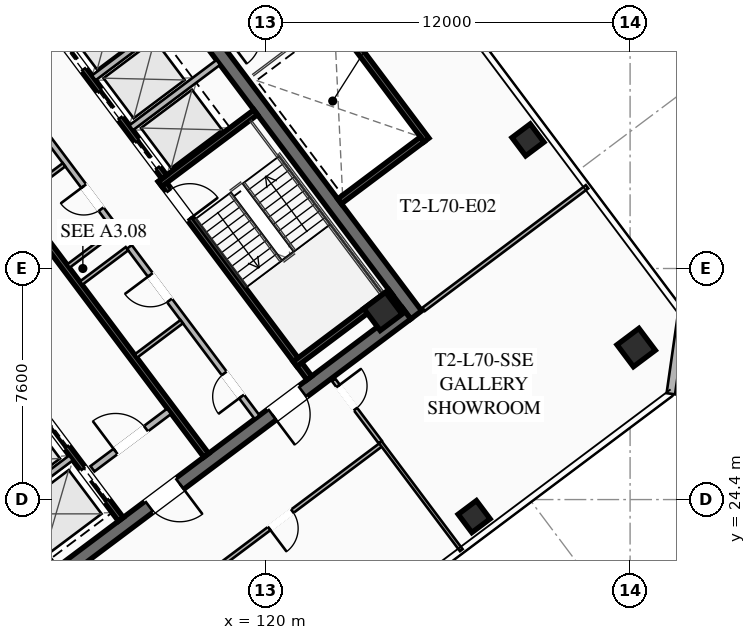
"""IFC4 building model, lengths in metres.
Left out: names, types, materials, properties, quantities, classifications, styles, units other than length and angle.
Written with IfcOpenShell. Run it as: python <this file> out.ifc"""

import sys

from ifc_helpers import new_model, si_unit, direction, frame, frame_2d, origin, origin_2d, place, context, subcontext, project, spatial, rectangle, hollow_rectangle, extrude, element, fill, save


model = new_model("IFC4")
c1 = context("Model", 3, precision=1e-05, world=origin(), true_north=direction((0.0, 1.0)))
c2 = subcontext(c1, "Body", "Model", "MODEL_VIEW")
j1 = project(units=[si_unit("LENGTHUNIT", "METRE"), si_unit("PLANEANGLEUNIT", "RADIAN")], contexts=[c1])
p1 = place(None, origin())
s1 = spatial("IfcSite", under=j1, at=p1, CompositionType="ELEMENT")
p2 = place(p1, origin())
s2 = spatial("IfcBuilding", under=s1, at=p2, CompositionType="ELEMENT")
p3 = place(p2, frame((0.0, 0.0, 259.4)))
s3 = spatial("IfcBuildingStorey", under=s2, at=p3, CompositionType="ELEMENT", Elevation=259.4)
p4 = place(p3, frame((115.604, 42.953, 0.0), z_axis=(0.0, 0.0, 1.0), x_axis=(0.600005007985, -0.799996243986, 0.0)))
e1 = element("IfcWall", 1, at=p4, inside=s3, PredefinedType="SHEAR", context=c2, shape_type="SweptSolid", body=[
    extrude(rectangle(XDim=15.6, YDim=0.45, at=frame_2d((7.8, 0.0))), origin(), (0.0, 0.0, 1.0), 4.0),
])
p5 = place(p3, frame((124.649, 30.518, 0.0), z_axis=(0.0, 0.0, 1.0), x_axis=(-0.8, -0.6, 0.0)))
e2 = element("IfcWall", 2, at=p5, inside=s3, PredefinedType="SHEAR", context=c2, shape_type="SweptSolid", body=[
    extrude(rectangle(XDim=15.26, YDim=0.45, at=frame_2d((7.63, 0.0))), origin(), (0.0, 0.0, 1.0), 4.0),
])
p6 = place(p5, frame((9.33, 0.0, 0.0)))
e3 = element("IfcOpeningElement", 3, at=p6, cuts=e2, PredefinedType="OPENING", context=c2, shape_type="SweptSolid", body=[
    extrude(rectangle(XDim=1.25, YDim=2.25, at=frame_2d((0.625, 1.125))), frame((0.0, 0.235, 0.0), z_axis=(0.0, -1.0, 0.0), x_axis=(1.0, 0.0, 0.0)), (0.0, 0.0, 1.0), 0.47),
])
p7 = place(p5, frame((4.28, 0.0, 0.0)))
e4 = element("IfcOpeningElement", 4, at=p7, cuts=e2, PredefinedType="OPENING", context=c2, shape_type="SweptSolid", body=[
    extrude(rectangle(XDim=1.25, YDim=2.25, at=frame_2d((0.625, 1.125))), frame((0.0, 0.235, 0.0), z_axis=(0.0, -1.0, 0.0), x_axis=(1.0, 0.0, 0.0)), (0.0, 0.0, 1.0), 0.47),
])
p8 = place(p3, frame((103.351, 33.482, 0.0), z_axis=(0.0, 0.0, 1.0), x_axis=(0.8, 0.6, 0.0)))
e5 = element("IfcWall", 5, at=p8, inside=s3, PredefinedType="SHEAR", context=c2, shape_type="SweptSolid", body=[
    extrude(rectangle(XDim=15.26, YDim=0.45, at=frame_2d((7.63, 0.0))), origin(), (0.0, 0.0, 1.0), 4.0),
])
p9 = place(p8, frame((4.68, 0.0, 0.0)))
e6 = element("IfcOpeningElement", 6, at=p9, cuts=e5, PredefinedType="OPENING", context=c2, shape_type="SweptSolid", body=[
    extrude(rectangle(XDim=1.25, YDim=2.25, at=frame_2d((0.625, 1.125))), frame((0.0, 0.235, 0.0), z_axis=(0.0, -1.0, 0.0), x_axis=(1.0, 0.0, 0.0)), (0.0, 0.0, 1.0), 0.47),
])
p10 = place(p8, frame((9.73, 0.0, 0.0)))
e7 = element("IfcOpeningElement", 7, at=p10, cuts=e5, PredefinedType="OPENING", context=c2, shape_type="SweptSolid", body=[
    extrude(rectangle(XDim=1.25, YDim=2.25, at=frame_2d((0.625, 1.125))), frame((0.0, 0.235, 0.0), z_axis=(0.0, -1.0, 0.0), x_axis=(1.0, 0.0, 0.0)), (0.0, 0.0, 1.0), 0.47),
])
for number, where, z_axis, x_axis in (
    (8, (112.59, 22.13, 0.0), (0.0, 0.0, 1.0), (0.8, 0.6, 0.0)),
    (9, (123.87, 30.59, 0.0), (0.0, 0.0, 1.0), (0.8, 0.6, 0.0)),
    (10, (132.2, 29.4, 0.0), (0.0, 0.0, 1.0), (0.8, 0.6, 0.0)),
):
    element("IfcColumn", number, at=place(p3, frame(where, z_axis=z_axis, x_axis=x_axis)), inside=s3, PredefinedType="COLUMN", context=c2, shape_type="SweptSolid", body=[
        extrude(hollow_rectangle(XDim=0.9, YDim=0.9, WallThickness=0.04, at=origin_2d()), origin(), (0.0, 0.0, 1.0), 3.7),
    ])
for number, where, z_axis, x_axis in (
    (11, (126.87, 23.84, 0.0), (0.0, 0.0, 1.0), (0.8, 0.6, 0.0)),
    (12, (128.64, 36.23, 0.0), (0.0, 0.0, 1.0), (0.8, 0.6, 0.0)),
):
    element("IfcColumn", number, at=place(p3, frame(where, z_axis=z_axis, x_axis=x_axis)), inside=s3, PredefinedType="COLUMN", context=c2, shape_type="SweptSolid", body=[
        extrude(hollow_rectangle(XDim=0.75, YDim=0.75, WallThickness=0.032, at=origin_2d()), origin(), (0.0, 0.0, 1.0), 3.7),
    ])
p11 = place(p3, frame((133.72, 30.54, 0.0), z_axis=(0.0, 0.0, 1.0), x_axis=(-0.141370477216, -0.989956760759, 0.0)))
e13 = element("IfcWall", 13, at=p11, inside=s3, PredefinedType="SOLIDWALL", context=c2, shape_type="SweptSolid", body=[
    extrude(rectangle(XDim=2.687, YDim=0.28, at=frame_2d((1.344, 0.0))), origin(), (0.0, 0.0, 1.0), 3.7),
])
p12 = place(p3, frame((116.56, 34.92, 0.0), z_axis=(0.0, 0.0, 1.0), x_axis=(0.59999041401, -0.800007189403, 0.0)))
e14 = element("IfcWall", 14, at=p12, inside=s3, PredefinedType="SHEAR", context=c2, shape_type="SweptSolid", body=[
    extrude(rectangle(XDim=8.15, YDim=0.2, at=frame_2d((4.075, 0.0))), origin(), (0.0, 0.0, 1.0), 3.7),
])
p13 = place(p12, frame((0.45, 0.0, 0.0)))
e15 = element("IfcOpeningElement", 15, at=p13, cuts=e14, PredefinedType="OPENING", context=c2, shape_type="SweptSolid", body=[
    extrude(rectangle(XDim=1.15, YDim=2.2, at=frame_2d((0.575, 1.1))), frame((0.0, 0.11, 0.0), z_axis=(0.0, -1.0, 0.0), x_axis=(1.0, 0.0, 0.0)), (0.0, 0.0, 1.0), 0.22),
])
for number, where, z_axis, x_axis in (
    (16, (116.54, 34.78, 0.0), (0.0, 0.0, 1.0), (0.8, 0.6, 0.0)),
    (17, (120.98, 28.86, 0.0), (0.0, 0.0, 1.0), (0.8, 0.6, 0.0)),
):
    element("IfcWall", number, at=place(p3, frame(where, z_axis=z_axis, x_axis=x_axis)), inside=s3, PredefinedType="SHEAR", context=c2, shape_type="SweptSolid", body=[
        extrude(rectangle(XDim=3.93, YDim=0.2, at=frame_2d((1.965, 0.0))), origin(), (0.0, 0.0, 1.0), 3.7),
    ])
p14 = place(p3, frame((118.058, 25.856, 0.0), z_axis=(0.0, 0.0, 1.0), x_axis=(-0.600002657301, 0.799998007018, 0.0)))
e18 = element("IfcWall", 18, at=p14, inside=s3, PredefinedType="SHEAR", context=c2, shape_type="SweptSolid", body=[
    extrude(rectangle(XDim=14.7, YDim=0.2, at=frame_2d((7.35, 0.0))), origin(), (0.0, 0.0, 1.0), 3.7),
])
p15 = place(p3, frame((114.316, 25.412, 0.0), z_axis=(0.0, 0.0, 1.0), x_axis=(0.800018601094, 0.59997519774, 0.0)))
e19 = element("IfcWall", 19, at=p15, inside=s3, PredefinedType="SOLIDWALL", context=c2, shape_type="SweptSolid", body=[
    extrude(rectangle(XDim=3.15, YDim=0.22, at=frame_2d((1.575, 0.0))), origin(), (0.0, 0.0, 1.0), 2.659),
])
p16 = place(p15, frame((0.95, 0.0, 0.0)))
e20 = element("IfcOpeningElement", 20, at=p16, cuts=e19, PredefinedType="OPENING", context=c2, shape_type="SweptSolid", body=[
    extrude(rectangle(XDim=1.25, YDim=2.25, at=frame_2d((0.625, 1.125))), frame((0.0, 0.12, 0.0), z_axis=(0.0, -1.0, 0.0), x_axis=(1.0, 0.0, 0.0)), (0.0, 0.0, 1.0), 0.24),
])
p17 = place(p3, frame((115.25, 23.75, 0.0), z_axis=(0.0, 0.0, 1.0), x_axis=(-0.599994036198, 0.800004472816, 0.0)))
e21 = element("IfcWall", 21, at=p17, inside=s3, PredefinedType="SHEAR", context=c2, shape_type="SweptSolid", body=[
    extrude(rectangle(XDim=6.55, YDim=0.2, at=frame_2d((3.275, 0.0))), origin(), (0.0, 0.0, 1.0), 3.7),
])
p18 = place(p17, frame((4.975, 0.0, 0.0)))
e22 = element("IfcOpeningElement", 22, at=p18, cuts=e21, PredefinedType="OPENING", context=c2, shape_type="SweptSolid", body=[
    extrude(rectangle(XDim=1.3, YDim=2.25, at=frame_2d((0.65, 1.125))), frame((0.0, 0.11, 0.0), z_axis=(0.0, -1.0, 0.0), x_axis=(1.0, 0.0, 0.0)), (0.0, 0.0, 1.0), 0.22),
])
p19 = place(p17, frame((2.975, 0.0, 0.0)))
e23 = element("IfcOpeningElement", 23, at=p19, cuts=e21, PredefinedType="OPENING", context=c2, shape_type="SweptSolid", body=[
    extrude(rectangle(XDim=1.3, YDim=2.25, at=frame_2d((0.65, 1.125))), frame((0.0, 0.11, 0.0), z_axis=(0.0, -1.0, 0.0), x_axis=(1.0, 0.0, 0.0)), (0.0, 0.0, 1.0), 0.22),
])
p20 = place(p17, frame((0.775, 0.0, 0.0)))
e24 = element("IfcOpeningElement", 24, at=p20, cuts=e21, PredefinedType="OPENING", context=c2, shape_type="SweptSolid", body=[
    extrude(rectangle(XDim=1.3, YDim=2.25, at=frame_2d((0.65, 1.125))), frame((0.0, 0.11, 0.0), z_axis=(0.0, -1.0, 0.0), x_axis=(1.0, 0.0, 0.0)), (0.0, 0.0, 1.0), 0.22),
])
p21 = place(p3, frame((110.746, 23.622, 0.0), z_axis=(0.0, 0.0, 1.0), x_axis=(0.800008183455, 0.599989088572, 0.0)))
e25 = element("IfcWall", 25, at=p21, inside=s3, PredefinedType="SOLIDWALL", context=c2, shape_type="SweptSolid", body=[
    extrude(rectangle(XDim=3.58, YDim=0.2, at=frame_2d((1.79, 0.0))), origin(), (0.0, 0.0, 1.0), 3.7),
])
p22 = place(p3, frame((112.75, 40.25, 0.0), z_axis=(0.0, 0.0, 1.0), x_axis=(0.599994036198, -0.800004472816, 0.0)))
e26 = element("IfcWall", 26, at=p22, inside=s3, PredefinedType="SHEAR", context=c2, shape_type="SweptSolid", body=[
    extrude(rectangle(XDim=6.55, YDim=0.2, at=frame_2d((3.275, 0.0))), origin(), (0.0, 0.0, 1.0), 3.7),
])
p23 = place(p22, frame((5.075, 0.0, 0.0)))
e27 = element("IfcOpeningElement", 27, at=p23, cuts=e26, PredefinedType="OPENING", context=c2, shape_type="SweptSolid", body=[
    extrude(rectangle(XDim=1.1, YDim=2.2, at=frame_2d((0.55, 1.1))), frame((0.0, 0.11, 0.0), z_axis=(0.0, -1.0, 0.0), x_axis=(1.0, 0.0, 0.0)), (0.0, 0.0, 1.0), 0.22),
])
p24 = place(p22, frame((3.025, 0.0, 0.0)))
e28 = element("IfcOpeningElement", 28, at=p24, cuts=e26, PredefinedType="OPENING", context=c2, shape_type="SweptSolid", body=[
    extrude(rectangle(XDim=1.1, YDim=2.2, at=frame_2d((0.55, 1.1))), frame((0.0, 0.11, 0.0), z_axis=(0.0, -1.0, 0.0), x_axis=(1.0, 0.0, 0.0)), (0.0, 0.0, 1.0), 0.22),
])
p25 = place(p22, frame((1.025, 0.0, 0.0)))
e29 = element("IfcOpeningElement", 29, at=p25, cuts=e26, PredefinedType="OPENING", context=c2, shape_type="SweptSolid", body=[
    extrude(rectangle(XDim=1.1, YDim=2.2, at=frame_2d((0.55, 1.1))), frame((0.0, 0.11, 0.0), z_axis=(0.0, -1.0, 0.0), x_axis=(1.0, 0.0, 0.0)), (0.0, 0.0, 1.0), 0.22),
])
for number, where, z_axis, x_axis in (
    (30, (115.59, 36.63, 0.0), (0.0, 0.0, 1.0), (0.8, 0.6, 0.0)),
    (31, (114.36, 38.27, 0.0), (0.0, 0.0, 1.0), (0.8, 0.6, 0.0)),
):
    element("IfcWall", number, at=place(p3, frame(where, z_axis=z_axis, x_axis=x_axis)), inside=s3, PredefinedType="SOLIDWALL", context=c2, shape_type="SweptSolid", body=[
        extrude(rectangle(XDim=3.58, YDim=0.2, at=frame_2d((1.79, 0.0))), origin(), (0.0, 0.0, 1.0), 3.7),
    ])
p26 = place(p3, frame((119.73, 27.11, 0.0), z_axis=(0.0, 0.0, 1.0), x_axis=(-0.600005580459, 0.799995814625, 0.0)))
e32 = element("IfcWall", 32, at=p26, inside=s3, PredefinedType="SOLIDWALL", context=c2, shape_type="SweptSolid", body=[
    extrude(rectangle(XDim=7.0, YDim=0.2, at=frame_2d((3.5, 0.0))), origin(), (0.0, 0.0, 1.0), 2.659),
])
p27 = place(p26, frame((0.85, 0.0, 0.0)))
e33 = element("IfcOpeningElement", 33, at=p27, cuts=e32, PredefinedType="OPENING", context=c2, shape_type="SweptSolid", body=[
    extrude(rectangle(XDim=0.95, YDim=2.05, at=frame_2d((0.475, 1.025))), frame((0.0, 0.11, 0.0), z_axis=(0.0, -1.0, 0.0), x_axis=(1.0, 0.0, 0.0)), (0.0, 0.0, 1.0), 0.22),
])
p28 = place(p26, frame((4.8, 0.0, 0.0)))
e34 = element("IfcOpeningElement", 34, at=p28, cuts=e32, PredefinedType="OPENING", context=c2, shape_type="SweptSolid", body=[
    extrude(rectangle(XDim=1.05, YDim=2.2, at=frame_2d((0.525, 1.1))), frame((0.0, 0.11, 0.0), z_axis=(0.0, -1.0, 0.0), x_axis=(1.0, 0.0, 0.0)), (0.0, 0.0, 1.0), 0.22),
])
for number, where, z_axis, x_axis in (
    (35, (113.946, 31.522, 0.0), (0.0, 0.0, 1.0), (0.8, 0.6, 0.0)),
    (36, (115.746, 29.122, 0.0), (0.0, 0.0, 1.0), (0.8, 0.6, 0.0)),
):
    element("IfcWall", number, at=place(p3, frame(where, z_axis=z_axis, x_axis=x_axis)), inside=s3, PredefinedType="PARTITIONING", context=c2, shape_type="SweptSolid", body=[
        extrude(rectangle(XDim=1.88, YDim=0.135, at=frame_2d((0.94, 0.0))), origin(), (0.0, 0.0, 1.0), 2.659),
    ])
p29 = place(p3, frame((115.11, 33.27, 0.0), z_axis=(0.0, 0.0, 1.0), x_axis=(-0.600011160345, 0.79999162962, 0.0)))
e37 = element("IfcWall", 37, at=p29, inside=s3, PredefinedType="SOLIDWALL", context=c2, shape_type="SweptSolid", body=[
    extrude(rectangle(XDim=7.0, YDim=0.2, at=frame_2d((3.5, 0.0))), origin(), (0.0, 0.0, 1.0), 2.659),
])
p30 = place(p29, frame((0.85, 0.0, 0.0)))
e38 = element("IfcOpeningElement", 38, at=p30, cuts=e37, PredefinedType="OPENING", context=c2, shape_type="SweptSolid", body=[
    extrude(rectangle(XDim=0.95, YDim=2.05, at=frame_2d((0.475, 1.025))), frame((0.0, 0.11, 0.0), z_axis=(0.0, -1.0, 0.0), x_axis=(1.0, 0.0, 0.0)), (0.0, 0.0, 1.0), 0.22),
])
p31 = place(p29, frame((4.85, 0.0, 0.0)))
e39 = element("IfcOpeningElement", 39, at=p31, cuts=e37, PredefinedType="OPENING", context=c2, shape_type="SweptSolid", body=[
    extrude(rectangle(XDim=0.95, YDim=2.05, at=frame_2d((0.475, 1.025))), frame((0.0, 0.11, 0.0), z_axis=(0.0, -1.0, 0.0), x_axis=(1.0, 0.0, 0.0)), (0.0, 0.0, 1.0), 0.22),
])
p32 = place(p3, frame((113.526, 32.082, 0.0), z_axis=(0.0, 0.0, 1.0), x_axis=(0.800046745961, 0.599937666993, 0.0)))
e40 = element("IfcWall", 40, at=p32, inside=s3, PredefinedType="PARTITIONING", context=c2, shape_type="SweptSolid", body=[
    extrude(rectangle(XDim=1.88, YDim=0.135, at=frame_2d((0.94, 0.0))), origin(), (0.0, 0.0, 1.0), 2.659),
])
p33 = place(p3, frame((111.876, 34.282, 0.0), z_axis=(0.0, 0.0, 1.0), x_axis=(0.8, 0.6, 0.0)))
e41 = element("IfcWall", 41, at=p33, inside=s3, PredefinedType="PARTITIONING", context=c2, shape_type="SweptSolid", body=[
    extrude(rectangle(XDim=1.88, YDim=0.135, at=frame_2d((0.94, 0.0))), origin(), (0.0, 0.0, 1.0), 2.659),
])
p34 = place(p3, frame((125.304, 36.228, 0.0), z_axis=(0.0, 0.0, 1.0), x_axis=(-0.59998851072, 0.800008616831, 0.0)))
e42 = element("IfcWall", 42, at=p34, inside=s3, PredefinedType="SHEAR", context=c2, shape_type="SweptSolid", body=[
    extrude(rectangle(XDim=6.8, YDim=0.2, at=frame_2d((3.4, 0.0))), origin(), (0.0, 0.0, 1.0), 3.7),
])
p35 = place(p3, frame((122.444, 34.208, 0.0), z_axis=(0.0, 0.0, 1.0), x_axis=(0.79999138319, 0.600011488909, 0.0)))
e43 = element("IfcWall", 43, at=p35, inside=s3, PredefinedType="SHEAR", context=c2, shape_type="SweptSolid", body=[
    extrude(rectangle(XDim=3.4, YDim=0.2, at=frame_2d((1.7, 0.0))), origin(), (0.0, 0.0, 1.0), 3.7),
])
p36 = place(p3, frame((99.65, 32.8, 0.0), z_axis=(0.0, 0.0, 1.0), x_axis=(0.8, 0.6, 0.0)))
e44 = element("IfcWall", 44, at=p36, inside=s3, PredefinedType="PARTITIONING", context=c2, shape_type="SweptSolid", body=[
    extrude(rectangle(XDim=23.85, YDim=0.135, at=frame_2d((11.925, 0.0))), origin(), (0.0, 0.0, 1.0), 2.659),
])
p37 = place(p36, frame((6.567, 0.0, 0.0)))
e45 = element("IfcOpeningElement", 45, at=p37, cuts=e44, PredefinedType="OPENING", context=c2, shape_type="SweptSolid", body=[
    extrude(rectangle(XDim=0.95, YDim=2.05, at=frame_2d((0.475, 1.025))), frame((0.0, 0.077, 0.0), z_axis=(0.0, -1.0, 0.0), x_axis=(1.0, 0.0, 0.0)), (0.0, 0.0, 1.0), 0.155),
])
p38 = place(p36, frame((10.788, 0.0, 0.0)))
e46 = element("IfcOpeningElement", 46, at=p38, cuts=e44, PredefinedType="OPENING", context=c2, shape_type="SweptSolid", body=[
    extrude(rectangle(XDim=0.95, YDim=2.05, at=frame_2d((0.475, 1.025))), frame((0.0, 0.077, 0.0), z_axis=(0.0, -1.0, 0.0), x_axis=(1.0, 0.0, 0.0)), (0.0, 0.0, 1.0), 0.155),
])
p39 = place(p3, frame((123.832, 26.224, 0.0), z_axis=(0.0, 0.0, 1.0), x_axis=(-0.799994292853, -0.600007609454, 0.0)))
e47 = element("IfcWall", 47, at=p39, inside=s3, PredefinedType="PARTITIONING", context=c2, shape_type="SweptSolid", body=[
    extrude(rectangle(XDim=15.4, YDim=0.135, at=frame_2d((7.7, 0.0))), origin(), (0.0, 0.0, 1.0), 2.659),
])
p40 = place(p39, frame((3.676, 0.0, 0.0)))
e48 = element("IfcOpeningElement", 48, at=p40, cuts=e47, PredefinedType="OPENING", context=c2, shape_type="SweptSolid", body=[
    extrude(rectangle(XDim=0.95, YDim=2.05, at=frame_2d((0.475, 1.025))), frame((0.0, 0.077, 0.0), z_axis=(0.0, -1.0, 0.0), x_axis=(1.0, 0.0, 0.0)), (0.0, 0.0, 1.0), 0.155),
])
p41 = place(p3, frame((122.248, 28.336, 0.0), z_axis=(0.0, 0.0, 1.0), x_axis=(0.6, -0.8, 0.0)))
e49 = element("IfcWall", 49, at=p41, inside=s3, PredefinedType="PARTITIONING", context=c2, shape_type="SweptSolid", body=[
    extrude(rectangle(XDim=2.56, YDim=0.135, at=frame_2d((1.28, 0.0))), origin(), (0.0, 0.0, 1.0), 2.659),
])
p42 = place(p41, frame((0.25, 0.0, 0.0)))
e50 = element("IfcOpeningElement", 50, at=p42, cuts=e49, PredefinedType="OPENING", context=c2, shape_type="SweptSolid", body=[
    extrude(rectangle(XDim=0.95, YDim=2.05, at=frame_2d((0.475, 1.025))), frame((0.0, 0.077, 0.0), z_axis=(0.0, -1.0, 0.0), x_axis=(1.0, 0.0, 0.0)), (0.0, 0.0, 1.0), 0.155),
])
p43 = place(p3, frame((126.448, 22.736, 0.0), z_axis=(0.0, 0.0, 1.0), x_axis=(-0.600008797747, 0.799993401614, 0.0)))
e51 = element("IfcWall", 51, at=p43, inside=s3, PredefinedType="PARTITIONING", context=c2, shape_type="SweptSolid", body=[
    extrude(rectangle(XDim=4.44, YDim=0.11, at=frame_2d((2.22, 0.0))), origin(), (0.0, 0.0, 1.0), 2.659),
])
p44 = place(p3, frame((125.208, 30.656, 0.0), z_axis=(0.0, 0.0, 1.0), x_axis=(0.8, 0.6, 0.0)))
e52 = element("IfcWall", 52, at=p44, inside=s3, PredefinedType="PARTITIONING", context=c2, shape_type="SweptSolid", body=[
    extrude(rectangle(XDim=6.72, YDim=0.135, at=frame_2d((3.36, 0.0))), origin(), (0.0, 0.0, 1.0), 2.659),
])
p45 = place(p6, origin())
e53 = element("IfcDoor", 53, at=p45, inside=s3, OperationType="SINGLE_SWING_LEFT", PredefinedType="DOOR", context=c2, shape_type="SweptSolid", body=[
    extrude(rectangle(XDim=1.25, YDim=2.25, at=frame_2d((0.625, 1.125))), frame((0.0, 0.025, 0.0), z_axis=(0.0, -1.0, 0.0), x_axis=(1.0, 0.0, 0.0)), (0.0, 0.0, 1.0), 0.05),
])
fill(e3, e53)
p46 = place(p7, origin())
e54 = element("IfcDoor", 54, at=p46, inside=s3, OperationType="SINGLE_SWING_RIGHT", PredefinedType="DOOR", context=c2, shape_type="SweptSolid", body=[
    extrude(rectangle(XDim=1.25, YDim=2.25, at=frame_2d((0.625, 1.125))), frame((0.0, 0.025, 0.0), z_axis=(0.0, -1.0, 0.0), x_axis=(1.0, 0.0, 0.0)), (0.0, 0.0, 1.0), 0.05),
])
fill(e4, e54)
p47 = place(p13, origin())
e55 = element("IfcDoor", 55, at=p47, inside=s3, OperationType="SINGLE_SWING_RIGHT", PredefinedType="DOOR", context=c2, shape_type="SweptSolid", body=[
    extrude(rectangle(XDim=1.15, YDim=2.2, at=frame_2d((0.575, 1.1))), frame((0.0, 0.025, 0.0), z_axis=(0.0, -1.0, 0.0), x_axis=(1.0, 0.0, 0.0)), (0.0, 0.0, 1.0), 0.05),
])
fill(e15, e55)
p48 = place(p16, origin())
e56 = element("IfcDoor", 56, at=p48, inside=s3, OperationType="SINGLE_SWING_LEFT", PredefinedType="DOOR", context=c2, shape_type="SweptSolid", body=[
    extrude(rectangle(XDim=1.25, YDim=2.25, at=frame_2d((0.625, 1.125))), frame((0.0, 0.025, 0.0), z_axis=(0.0, -1.0, 0.0), x_axis=(1.0, 0.0, 0.0)), (0.0, 0.0, 1.0), 0.05),
])
fill(e20, e56)
p49 = place(p27, origin())
e57 = element("IfcDoor", 57, at=p49, inside=s3, OperationType="SINGLE_SWING_LEFT", PredefinedType="DOOR", context=c2, shape_type="SweptSolid", body=[
    extrude(rectangle(XDim=0.95, YDim=2.05, at=frame_2d((0.475, 1.025))), frame((0.0, 0.025, 0.0), z_axis=(0.0, -1.0, 0.0), x_axis=(1.0, 0.0, 0.0)), (0.0, 0.0, 1.0), 0.05),
])
fill(e33, e57)
p50 = place(p28, origin())
e58 = element("IfcDoor", 58, at=p50, inside=s3, OperationType="SINGLE_SWING_RIGHT", PredefinedType="DOOR", context=c2, shape_type="SweptSolid", body=[
    extrude(rectangle(XDim=1.05, YDim=2.2, at=frame_2d((0.525, 1.1))), frame((0.0, 0.025, 0.0), z_axis=(0.0, -1.0, 0.0), x_axis=(1.0, 0.0, 0.0)), (0.0, 0.0, 1.0), 0.05),
])
fill(e34, e58)
p51 = place(p30, origin())
e59 = element("IfcDoor", 59, at=p51, inside=s3, OperationType="SINGLE_SWING_RIGHT", PredefinedType="DOOR", context=c2, shape_type="SweptSolid", body=[
    extrude(rectangle(XDim=0.95, YDim=2.05, at=frame_2d((0.475, 1.025))), frame((0.0, 0.025, 0.0), z_axis=(0.0, -1.0, 0.0), x_axis=(1.0, 0.0, 0.0)), (0.0, 0.0, 1.0), 0.05),
])
fill(e38, e59)
p52 = place(p40, origin())
e60 = element("IfcDoor", 60, at=p52, inside=s3, OperationType="SINGLE_SWING_RIGHT", PredefinedType="DOOR", context=c2, shape_type="SweptSolid", body=[
    extrude(rectangle(XDim=0.95, YDim=2.05, at=frame_2d((0.475, 1.025))), frame((0.0, 0.025, 0.0), z_axis=(0.0, -1.0, 0.0), x_axis=(1.0, 0.0, 0.0)), (0.0, 0.0, 1.0), 0.05),
])
fill(e48, e60)
p53 = place(p42, origin())
e61 = element("IfcDoor", 61, at=p53, inside=s3, OperationType="SINGLE_SWING_LEFT", PredefinedType="DOOR", context=c2, shape_type="SweptSolid", body=[
    extrude(rectangle(XDim=0.95, YDim=2.05, at=frame_2d((0.475, 1.025))), frame((0.0, 0.025, 0.0), z_axis=(0.0, -1.0, 0.0), x_axis=(1.0, 0.0, 0.0)), (0.0, 0.0, 1.0), 0.05),
])
fill(e50, e61)
p54 = place(p19, origin())
e62 = element("IfcDoor", 62, at=p54, inside=s3, OperationType="SLIDING_TO_LEFT", PredefinedType="DOOR", context=c2, shape_type="SweptSolid", body=[
    extrude(rectangle(XDim=1.3, YDim=2.25, at=frame_2d((0.65, 1.125))), frame((0.0, 0.025, 0.0), z_axis=(0.0, -1.0, 0.0), x_axis=(1.0, 0.0, 0.0)), (0.0, 0.0, 1.0), 0.05),
])
fill(e23, e62)
p55 = place(p20, origin())
e63 = element("IfcDoor", 63, at=p55, inside=s3, OperationType="SLIDING_TO_LEFT", PredefinedType="DOOR", context=c2, shape_type="SweptSolid", body=[
    extrude(rectangle(XDim=1.3, YDim=2.25, at=frame_2d((0.65, 1.125))), frame((0.0, 0.025, 0.0), z_axis=(0.0, -1.0, 0.0), x_axis=(1.0, 0.0, 0.0)), (0.0, 0.0, 1.0), 0.05),
])
fill(e24, e63)
p56 = place(p23, origin())
e64 = element("IfcDoor", 64, at=p56, inside=s3, OperationType="SLIDING_TO_LEFT", PredefinedType="DOOR", context=c2, shape_type="SweptSolid", body=[
    extrude(rectangle(XDim=1.1, YDim=2.2, at=frame_2d((0.55, 1.1))), frame((0.0, 0.025, 0.0), z_axis=(0.0, -1.0, 0.0), x_axis=(1.0, 0.0, 0.0)), (0.0, 0.0, 1.0), 0.05),
])
fill(e27, e64)
p57 = place(p24, origin())
e65 = element("IfcDoor", 65, at=p57, inside=s3, OperationType="SLIDING_TO_LEFT", PredefinedType="DOOR", context=c2, shape_type="SweptSolid", body=[
    extrude(rectangle(XDim=1.1, YDim=2.2, at=frame_2d((0.55, 1.1))), frame((0.0, 0.025, 0.0), z_axis=(0.0, -1.0, 0.0), x_axis=(1.0, 0.0, 0.0)), (0.0, 0.0, 1.0), 0.05),
])
fill(e28, e65)
p58 = place(p25, origin())
e66 = element("IfcDoor", 66, at=p58, inside=s3, OperationType="SLIDING_TO_LEFT", PredefinedType="DOOR", context=c2, shape_type="SweptSolid", body=[
    extrude(rectangle(XDim=1.1, YDim=2.2, at=frame_2d((0.55, 1.1))), frame((0.0, 0.025, 0.0), z_axis=(0.0, -1.0, 0.0), x_axis=(1.0, 0.0, 0.0)), (0.0, 0.0, 1.0), 0.05),
])
fill(e29, e66)
save(model, sys.argv[1])
